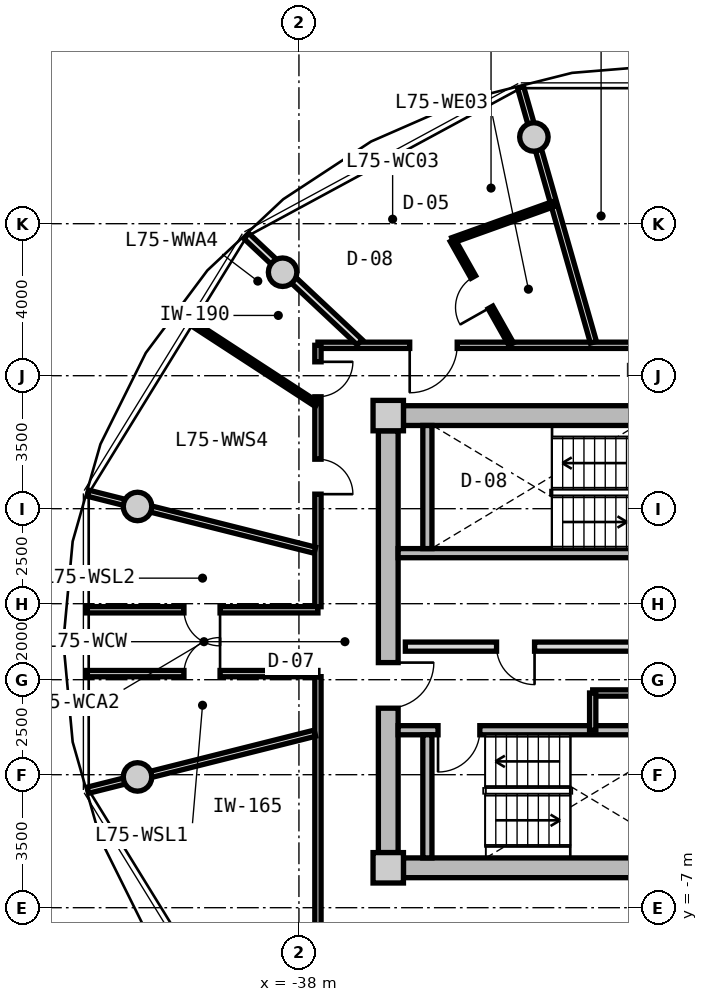
"""IFC4 building model, lengths in metres.
Left out: names, types, materials, properties, quantities, classifications, styles, units other than length and angle.
Written with IfcOpenShell. Run it as: python <this file> out.ifc"""

import sys

from ifc_helpers import new_model, si_unit, direction, frame, frame_2d, origin, origin_2d, place, context, subcontext, project, spatial, rectangle, circle, extrude, source, transform, mapped, element, fill, save


model = new_model("IFC4")
c1 = context("Model", 3, precision=1e-05, world=origin(), true_north=direction((0.0, 1.0)))
c2 = subcontext(c1, "Body", "Model", "MODEL_VIEW")
j1 = project(units=[si_unit("LENGTHUNIT", "METRE"), si_unit("PLANEANGLEUNIT", "RADIAN")], contexts=[c1])
p1 = place(None, origin())
s1 = spatial("IfcSite", under=j1, at=p1, CompositionType="ELEMENT")
p2 = place(p1, origin())
s2 = spatial("IfcBuilding", under=s1, at=p2, CompositionType="ELEMENT")
p3 = place(p2, frame((0.0, 0.0, 241.35)))
s3 = spatial("IfcBuildingStorey", under=s2, at=p3, CompositionType="ELEMENT", Elevation=241.35)
m1 = source(origin(), c2, "Body", "SweptSolid", [
    extrude(rectangle(XDim=0.8, YDim=0.8, at=origin_2d()), origin(), (0.0, 0.0, 1.0), 3.05),
])
for number, where, z_axis, x_axis in (
    (1, (-35.65, -5.95, 0.0), (0.0, 0.0, 1.0), (1.0, 0.0, 0.0)),
    (2, (-35.65, 5.95, 0.0), (0.0, 0.0, 1.0), (1.0, 0.0, 0.0)),
):
    element("IfcColumn", number, at=place(p3, frame(where, z_axis=z_axis, x_axis=x_axis)), inside=s3, PredefinedType="COLUMN", context=c2, shape_type="MappedRepresentation", body=[
        mapped(m1, transform((0.0, 0.0, 0.0), x_axis=(1.0, 0.0, 0.0), y_axis=(0.0, 1.0, 0.0), z_axis=(0.0, 0.0, 1.0), scale=1.0)),
    ])
m2 = source(origin(), c2, "Body", "SweptSolid", [
    extrude(rectangle(XDim=14.5, YDim=0.52, at=frame_2d((7.25, 0.0))), origin(), (0.0, 0.0, 1.0), 2.73),
])
for number, where, z_axis, x_axis in (
    (3, (-35.25, 5.95, 0.0), (0.0, 0.0, 1.0), (1.0, 0.0, 0.0)),
    (4, (-20.75, -5.95, 0.0), (0.0, 0.0, 1.0), (-1.0, 0.0, 0.0)),
):
    element("IfcWall", number, at=place(p3, frame(where, z_axis=z_axis, x_axis=x_axis)), inside=s3, PredefinedType="SHEAR", context=c2, shape_type="MappedRepresentation", body=[
        mapped(m2, transform((0.0, 0.0, 0.0), x_axis=(1.0, 0.0, 0.0), y_axis=(0.0, 1.0, 0.0), z_axis=(0.0, 0.0, 1.0), scale=1.0)),
    ])
m3 = source(origin(), c2, "Body", "SweptSolid", [
    extrude(rectangle(XDim=11.1, YDim=0.52, at=frame_2d((5.55, 0.0))), origin(), (0.0, 0.0, 1.0), 2.73),
])
p4 = place(p3, frame((-35.65, -5.55, 0.0), z_axis=(0.0, 0.0, 1.0), x_axis=(0.0, 1.0, 0.0)))
e5 = element("IfcWall", 5, at=p4, inside=s3, PredefinedType="SHEAR", context=c2, shape_type="MappedRepresentation", body=[
    mapped(m3, transform((0.0, 0.0, 0.0), x_axis=(1.0, 0.0, 0.0), y_axis=(0.0, 1.0, 0.0), z_axis=(0.0, 0.0, 1.0), scale=1.0)),
])
p5 = place(p4, frame((3.8, 0.0, 0.0)))
e6 = element("IfcOpeningElement", 6, at=p5, cuts=e5, PredefinedType="OPENING", context=c2, shape_type="SweptSolid", body=[
    extrude(rectangle(XDim=1.2, YDim=2.15, at=frame_2d((0.6, 1.075))), frame((0.0, 0.27, 0.0), z_axis=(0.0, -1.0, 0.0), x_axis=(1.0, 0.0, 0.0)), (0.0, 0.0, 1.0), 0.54),
])
m4 = source(origin(), c2, "Body", "SweptSolid", [
    extrude(circle(Radius=0.375, at=origin_2d()), origin(), (0.0, 0.0, 1.0), 3.05),
])
for number, where, z_axis, x_axis in (
    (7, (-31.818, 13.281, 0.0), (0.0, 0.0, 1.0), (1.0, 0.0, 0.0)),
    (8, (-38.43, 9.723, 0.0), (0.0, 0.0, 1.0), (1.0, 0.0, 0.0)),
    (9, (-42.247, 3.559, 0.0), (0.0, 0.0, 1.0), (1.0, 0.0, 0.0)),
    (10, (-42.247, -3.559, 0.0), (0.0, 0.0, 1.0), (1.0, 0.0, 0.0)),
):
    element("IfcColumn", number, at=place(p3, frame(where, z_axis=z_axis, x_axis=x_axis)), inside=s3, PredefinedType="COLUMN", context=c2, shape_type="MappedRepresentation", body=[
        mapped(m4, transform((0.0, 0.0, 0.0), x_axis=(1.0, 0.0, 0.0), y_axis=(0.0, 1.0, 0.0), z_axis=(0.0, 0.0, 1.0), scale=1.0)),
    ])
m5 = source(origin(), c2, "Body", "SweptSolid", [
    extrude(rectangle(XDim=7.93, YDim=0.24, at=frame_2d((3.965, 0.0))), origin(), (0.0, 0.0, 1.0), 2.73),
])
p6 = place(p3, frame((-35.39, 2.33, 0.0), z_axis=(0.0, 0.0, 1.0), x_axis=(1.0, 0.0, 0.0)))
e11 = element("IfcWall", 11, at=p6, inside=s3, PredefinedType="PARTITIONING", context=c2, shape_type="MappedRepresentation", body=[
    mapped(m5, transform((0.0, 0.0, 0.0), x_axis=(1.0, 0.0, 0.0), y_axis=(0.0, 1.0, 0.0), z_axis=(0.0, 0.0, 1.0), scale=1.0)),
])
m6 = source(origin(), c2, "Body", "SweptSolid", [
    extrude(rectangle(XDim=3.24, YDim=0.24, at=frame_2d((1.62, 0.0))), origin(), (0.0, 0.0, 1.0), 2.73),
])
p7 = place(p3, frame((-34.62, 2.45, 0.0), z_axis=(0.0, 0.0, 1.0), x_axis=(0.0, 1.0, 0.0)))
e12 = element("IfcWall", 12, at=p7, inside=s3, PredefinedType="PARTITIONING", context=c2, shape_type="MappedRepresentation", body=[
    mapped(m6, transform((0.0, 0.0, 0.0), x_axis=(1.0, 0.0, 0.0), y_axis=(0.0, 1.0, 0.0), z_axis=(0.0, 0.0, 1.0), scale=1.0)),
])
p8 = place(p3, frame((-35.39, -2.33, 0.0), z_axis=(0.0, 0.0, 1.0), x_axis=(1.0, 0.0, 0.0)))
e13 = element("IfcWall", 13, at=p8, inside=s3, PredefinedType="PARTITIONING", context=c2, shape_type="MappedRepresentation", body=[
    mapped(m5, transform((0.0, 0.0, 0.0), x_axis=(1.0, 0.0, 0.0), y_axis=(0.0, 1.0, 0.0), z_axis=(0.0, 0.0, 1.0), scale=1.0)),
])
p9 = place(p8, frame((1.05, 0.0, 0.0)))
e14 = element("IfcOpeningElement", 14, at=p9, cuts=e13, PredefinedType="OPENING", context=c2, shape_type="SweptSolid", body=[
    extrude(rectangle(XDim=1.1, YDim=2.15, at=frame_2d((0.55, 1.075))), frame((0.0, 0.13, 0.0), z_axis=(0.0, -1.0, 0.0), x_axis=(1.0, 0.0, 0.0)), (0.0, 0.0, 1.0), 0.26),
])
p10 = place(p3, frame((-34.62, -5.69, 0.0), z_axis=(0.0, 0.0, 1.0), x_axis=(0.0, 1.0, 0.0)))
e15 = element("IfcWall", 15, at=p10, inside=s3, PredefinedType="PARTITIONING", context=c2, shape_type="MappedRepresentation", body=[
    mapped(m6, transform((0.0, 0.0, 0.0), x_axis=(1.0, 0.0, 0.0), y_axis=(0.0, 1.0, 0.0), z_axis=(0.0, 0.0, 1.0), scale=1.0)),
])
m7 = source(origin(), c2, "Body", "SweptSolid", [
    extrude(rectangle(XDim=7.62, YDim=0.24, at=frame_2d((3.81, 0.0))), origin(), (0.0, 0.0, 1.0), 2.715),
])
p11 = place(p3, frame((-35.2, -0.13, 0.0), z_axis=(0.0, 0.0, 1.0), x_axis=(1.0, 0.0, 0.0)))
e16 = element("IfcWall", 16, at=p11, inside=s3, PredefinedType="PARTITIONING", context=c2, shape_type="MappedRepresentation", body=[
    mapped(m7, transform((0.0, 0.0, 0.0), x_axis=(1.0, 0.0, 0.0), y_axis=(0.0, 1.0, 0.0), z_axis=(0.0, 0.0, 1.0), scale=1.0)),
])
p12 = place(p11, frame((6.22, 0.0, 0.0)))
e17 = element("IfcOpeningElement", 17, at=p12, cuts=e16, PredefinedType="OPENING", context=c2, shape_type="SweptSolid", body=[
    extrude(rectangle(XDim=1.0, YDim=2.1, at=frame_2d((0.5, 1.05))), frame((0.0, 0.13, 0.0), z_axis=(0.0, -1.0, 0.0), x_axis=(1.0, 0.0, 0.0)), (0.0, 0.0, 1.0), 0.26),
])
p13 = place(p11, frame((2.4, 0.0, 0.0)))
e18 = element("IfcOpeningElement", 18, at=p13, cuts=e16, PredefinedType="OPENING", context=c2, shape_type="SweptSolid", body=[
    extrude(rectangle(XDim=1.0, YDim=2.1, at=frame_2d((0.5, 1.05))), frame((0.0, 0.13, 0.0), z_axis=(0.0, -1.0, 0.0), x_axis=(1.0, 0.0, 0.0)), (0.0, 0.0, 1.0), 0.26),
])
m8 = source(origin(), c2, "Body", "SweptSolid", [
    extrude(rectangle(XDim=4.77, YDim=0.165, at=frame_2d((2.385, 0.0))), origin(), (0.0, 0.0, 1.0), 2.715),
])
p14 = place(p3, frame((-30.27, -1.35, 0.0), z_axis=(0.0, 0.0, 1.0), x_axis=(1.0, 0.0, 0.0)))
e19 = element("IfcWall", 19, at=p14, inside=s3, PredefinedType="PARTITIONING", context=c2, shape_type="MappedRepresentation", body=[
    mapped(m8, transform((0.0, 0.0, 0.0), x_axis=(1.0, 0.0, 0.0), y_axis=(0.0, 1.0, 0.0), z_axis=(0.0, 0.0, 1.0), scale=1.0)),
])
p15 = place(p14, frame((1.85, 0.0, 0.0)))
e20 = element("IfcOpeningElement", 20, at=p15, cuts=e19, PredefinedType="OPENING", context=c2, shape_type="SweptSolid", body=[
    extrude(rectangle(XDim=1.0, YDim=2.1, at=frame_2d((0.5, 1.05))), frame((0.0, 0.093, 0.0), z_axis=(0.0, -1.0, 0.0), x_axis=(1.0, 0.0, 0.0)), (0.0, 0.0, 1.0), 0.185),
])
m9 = source(origin(), c2, "Body", "SweptSolid", [
    extrude(rectangle(XDim=0.98, YDim=0.165, at=frame_2d((0.49, 0.0))), origin(), (0.0, 0.0, 1.0), 2.715),
])
p16 = place(p3, frame((-30.27, -2.33, 0.0), z_axis=(0.0, 0.0, 1.0), x_axis=(0.0, 1.0, 0.0)))
e21 = element("IfcWall", 21, at=p16, inside=s3, PredefinedType="PARTITIONING", context=c2, shape_type="MappedRepresentation", body=[
    mapped(m9, transform((0.0, 0.0, 0.0), x_axis=(1.0, 0.0, 0.0), y_axis=(0.0, 1.0, 0.0), z_axis=(0.0, 0.0, 1.0), scale=1.0)),
])
m10 = source(origin(), c2, "Body", "SweptSolid", [
    extrude(rectangle(XDim=8.58, YDim=0.165, at=frame_2d((4.29, 0.0))), origin(), (0.0, 0.0, 1.0), 2.715),
])
p17 = place(p3, frame((-37.5, 7.8, 0.0), z_axis=(0.0, 0.0, 1.0), x_axis=(1.0, 0.0, 0.0)))
e22 = element("IfcWall", 22, at=p17, inside=s3, PredefinedType="PARTITIONING", context=c2, shape_type="MappedRepresentation", body=[
    mapped(m10, transform((0.0, 0.0, 0.0), x_axis=(1.0, 0.0, 0.0), y_axis=(0.0, 1.0, 0.0), z_axis=(0.0, 0.0, 1.0), scale=1.0)),
])
p18 = place(p17, frame((2.415, 0.0, 0.0)))
e23 = element("IfcOpeningElement", 23, at=p18, cuts=e22, PredefinedType="OPENING", context=c2, shape_type="SweptSolid", body=[
    extrude(rectangle(XDim=1.25, YDim=2.2, at=frame_2d((0.625, 1.1))), frame((0.0, 0.093, 0.0), z_axis=(0.0, -1.0, 0.0), x_axis=(1.0, 0.0, 0.0)), (0.0, 0.0, 1.0), 0.185),
])
m11 = source(origin(), c2, "Body", "SweptSolid", [
    extrude(rectangle(XDim=6.88, YDim=0.165, at=frame_2d((3.44, 0.0))), origin(), (0.0, 0.0, 1.0), 2.715),
])
p19 = place(p3, frame((-37.5, -7.8, 0.0), z_axis=(0.0, 0.0, 1.0), x_axis=(0.0, 1.0, 0.0)))
e24 = element("IfcWall", 24, at=p19, inside=s3, PredefinedType="PARTITIONING", context=c2, shape_type="MappedRepresentation", body=[
    mapped(m11, transform((0.0, 0.0, 0.0), x_axis=(1.0, 0.0, 0.0), y_axis=(0.0, 1.0, 0.0), z_axis=(0.0, 0.0, 1.0), scale=1.0)),
])
p20 = place(p3, frame((-37.5, 0.92, 0.0), z_axis=(0.0, 0.0, 1.0), x_axis=(0.0, 1.0, 0.0)))
e25 = element("IfcWall", 25, at=p20, inside=s3, PredefinedType="PARTITIONING", context=c2, shape_type="MappedRepresentation", body=[
    mapped(m11, transform((0.0, 0.0, 0.0), x_axis=(1.0, 0.0, 0.0), y_axis=(0.0, 1.0, 0.0), z_axis=(0.0, 0.0, 1.0), scale=1.0)),
])
p21 = place(p20, frame((5.525, 0.0, 0.0)))
e26 = element("IfcOpeningElement", 26, at=p21, cuts=e25, PredefinedType="OPENING", context=c2, shape_type="SweptSolid", body=[
    extrude(rectangle(XDim=0.92, YDim=2.1, at=frame_2d((0.46, 1.05))), frame((0.0, 0.093, 0.0), z_axis=(0.0, -1.0, 0.0), x_axis=(1.0, 0.0, 0.0)), (0.0, 0.0, 1.0), 0.185),
])
p22 = place(p20, frame((2.962, 0.0, 0.0)))
e27 = element("IfcOpeningElement", 27, at=p22, cuts=e25, PredefinedType="OPENING", context=c2, shape_type="SweptSolid", body=[
    extrude(rectangle(XDim=0.92, YDim=2.1, at=frame_2d((0.46, 1.05))), frame((0.0, 0.093, 0.0), z_axis=(0.0, -1.0, 0.0), x_axis=(1.0, 0.0, 0.0)), (0.0, 0.0, 1.0), 0.185),
])
m12 = source(origin(), c2, "Body", "SweptSolid", [
    extrude(rectangle(XDim=6.974, YDim=0.165, at=frame_2d((3.487, 0.0))), origin(), (0.0, 0.0, 1.0), 2.315),
])
p23 = place(p3, frame((-30.251, 7.88, 0.0), z_axis=(0.0, 0.0, 1.0), x_axis=(-0.274707256801, 0.961527910703, 0.0)))
e28 = element("IfcWall", 28, at=p23, inside=s3, PredefinedType="PARTITIONING", context=c2, shape_type="MappedRepresentation", body=[
    mapped(m12, transform((0.0, 0.0, 0.0), x_axis=(1.0, 0.0, 0.0), y_axis=(0.0, 1.0, 0.0), z_axis=(0.0, 0.0, 1.0), scale=1.0)),
])
m13 = source(origin(), c2, "Body", "SweptSolid", [
    extrude(rectangle(XDim=6.157, YDim=0.165, at=frame_2d((3.079, 0.0))), origin(), (0.0, 0.0, 1.0), 2.315),
])
for number, where, z_axis, x_axis in (
    (29, (-37.58, 2.407, 0.0), (0.0, 0.0, 1.0), (-0.97, 0.244, 0.0)),
    (30, (-37.58, -2.407, 0.0), (0.0, 0.0, 1.0), (-0.97, -0.244, 0.0)),
):
    element("IfcWall", number, at=place(p3, frame(where, z_axis=z_axis, x_axis=x_axis)), inside=s3, PredefinedType="PARTITIONING", context=c2, shape_type="MappedRepresentation", body=[
        mapped(m13, transform((0.0, 0.0, 0.0), x_axis=(1.0, 0.0, 0.0), y_axis=(0.0, 1.0, 0.0), z_axis=(0.0, 0.0, 1.0), scale=1.0)),
    ])
m14 = source(origin(), c2, "Body", "SweptSolid", [
    extrude(rectangle(XDim=6.101, YDim=0.165, at=frame_2d((3.051, 0.0))), origin(), (0.0, 0.0, 1.0), 2.715),
])
p24 = place(p3, frame((-43.601, 0.84, 0.0), z_axis=(0.0, 0.0, 1.0), x_axis=(1.0, 0.0, 0.0)))
e31 = element("IfcWall", 31, at=p24, inside=s3, PredefinedType="PARTITIONING", context=c2, shape_type="MappedRepresentation", body=[
    mapped(m14, transform((0.0, 0.0, 0.0), x_axis=(1.0, 0.0, 0.0), y_axis=(0.0, 1.0, 0.0), z_axis=(0.0, 0.0, 1.0), scale=1.0)),
])
p25 = place(p24, frame((2.576, 0.0, 0.0)))
e32 = element("IfcOpeningElement", 32, at=p25, cuts=e31, PredefinedType="OPENING", context=c2, shape_type="SweptSolid", body=[
    extrude(rectangle(XDim=0.95, YDim=2.1, at=frame_2d((0.475, 1.05))), frame((0.0, 0.093, 0.0), z_axis=(0.0, -1.0, 0.0), x_axis=(1.0, 0.0, 0.0)), (0.0, 0.0, 1.0), 0.185),
])
p26 = place(p3, frame((-37.5, -0.84, 0.0), z_axis=(0.0, 0.0, 1.0), x_axis=(-1.0, 0.0, 0.0)))
e33 = element("IfcWall", 33, at=p26, inside=s3, PredefinedType="PARTITIONING", context=c2, shape_type="MappedRepresentation", body=[
    mapped(m14, transform((0.0, 0.0, 0.0), x_axis=(1.0, 0.0, 0.0), y_axis=(0.0, 1.0, 0.0), z_axis=(0.0, 0.0, 1.0), scale=1.0)),
])
p27 = place(p26, frame((2.576, 0.0, 0.0)))
e34 = element("IfcOpeningElement", 34, at=p27, cuts=e33, PredefinedType="OPENING", context=c2, shape_type="SweptSolid", body=[
    extrude(rectangle(XDim=0.95, YDim=2.1, at=frame_2d((0.475, 1.05))), frame((0.0, 0.093, 0.0), z_axis=(0.0, -1.0, 0.0), x_axis=(1.0, 0.0, 0.0)), (0.0, 0.0, 1.0), 0.185),
])
m15 = source(origin(), c2, "Body", "SweptSolid", [
    extrude(rectangle(XDim=4.089, YDim=0.19, at=frame_2d((2.044, 0.0))), origin(), (0.0, 0.0, 1.0), 2.315),
])
p28 = place(p3, frame((-36.402, 7.88, 0.0), z_axis=(0.0, 0.0, 1.0), x_axis=(-0.729401273609, 0.684086092577, 0.0)))
e35 = element("IfcWall", 35, at=p28, inside=s3, PredefinedType="PARTITIONING", context=c2, shape_type="MappedRepresentation", body=[
    mapped(m15, transform((0.0, 0.0, 0.0), x_axis=(1.0, 0.0, 0.0), y_axis=(0.0, 1.0, 0.0), z_axis=(0.0, 0.0, 1.0), scale=1.0)),
])
m16 = source(origin(), c2, "Body", "SweptSolid", [
    extrude(rectangle(XDim=3.14, YDim=0.14, at=frame_2d((1.57, 0.0))), origin(), (0.0, 0.0, 1.0), 2.715),
])
p29 = place(p3, frame((-32.415, 7.83, 0.0), z_axis=(0.0, 0.0, 1.0), x_axis=(-0.491132137966, 0.871085083707, 0.0)))
e36 = element("IfcWall", 36, at=p29, inside=s3, PredefinedType="PARTITIONING", context=c2, shape_type="MappedRepresentation", body=[
    mapped(m16, transform((0.0, 0.0, 0.0), x_axis=(1.0, 0.0, 0.0), y_axis=(0.0, 1.0, 0.0), z_axis=(0.0, 0.0, 1.0), scale=1.0)),
])
p30 = place(p29, frame((1.11, 0.0, 0.0)))
e37 = element("IfcOpeningElement", 37, at=p30, cuts=e36, PredefinedType="OPENING", context=c2, shape_type="SweptSolid", body=[
    extrude(rectangle(XDim=0.92, YDim=2.1, at=frame_2d((0.46, 1.05))), frame((0.0, 0.08, 0.0), z_axis=(0.0, -1.0, 0.0), x_axis=(1.0, 0.0, 0.0)), (0.0, 0.0, 1.0), 0.16),
])
m17 = source(origin(), c2, "Body", "SweptSolid", [
    extrude(rectangle(XDim=2.831, YDim=0.14, at=frame_2d((1.416, 0.0))), origin(), (0.0, 0.0, 1.0), 2.715),
])
p31 = place(p3, frame((-33.957, 10.565, 0.0), z_axis=(0.0, 0.0, 1.0), x_axis=(0.941411742535, 0.337259441701, 0.0)))
e38 = element("IfcWall", 38, at=p31, inside=s3, PredefinedType="PARTITIONING", context=c2, shape_type="MappedRepresentation", body=[
    mapped(m17, transform((0.0, 0.0, 0.0), x_axis=(1.0, 0.0, 0.0), y_axis=(0.0, 1.0, 0.0), z_axis=(0.0, 0.0, 1.0), scale=1.0)),
])
m18 = source(origin(), c2, "Body", "SweptSolid", [
    extrude(rectangle(XDim=3.904, YDim=0.14, at=frame_2d((1.952, 0.0))), origin(), (0.0, 0.0, 1.0), 2.715),
])
p32 = place(p3, frame((-37.53, 6.246, 0.0), z_axis=(0.0, 0.0, 1.0), x_axis=(-0.838024687996, 0.545632314209, 0.0)))
e39 = element("IfcWall", 39, at=p32, inside=s3, PredefinedType="PARTITIONING", context=c2, shape_type="MappedRepresentation", body=[
    mapped(m18, transform((0.0, 0.0, 0.0), x_axis=(1.0, 0.0, 0.0), y_axis=(0.0, 1.0, 0.0), z_axis=(0.0, 0.0, 1.0), scale=1.0)),
])
m19 = source(origin(), c2, "Body", "SweptSolid", [
    extrude(rectangle(XDim=1.1, YDim=2.15, at=frame_2d((0.55, 1.075))), frame((0.0, 0.025, 0.0), z_axis=(0.0, -1.0, 0.0), x_axis=(1.0, 0.0, 0.0)), (0.0, 0.0, 1.0), 0.05),
])
p33 = place(p9, frame((1.1, 0.0, 0.0), z_axis=(0.0, 0.0, 1.0), x_axis=(-1.0, 0.0, 0.0)))
e40 = element("IfcDoor", 40, at=p33, inside=s3, OperationType="SINGLE_SWING_RIGHT", PredefinedType="DOOR", context=c2, shape_type="MappedRepresentation", body=[
    mapped(m19, transform((0.0, 0.0, 0.0), x_axis=(1.0, 0.0, 0.0), y_axis=(0.0, 1.0, 0.0), z_axis=(0.0, 0.0, 1.0), scale=1.0)),
])
fill(e14, e40)
m20 = source(origin(), c2, "Body", "SweptSolid", [
    extrude(rectangle(XDim=1.2, YDim=2.15, at=frame_2d((0.6, 1.075))), frame((0.0, 0.025, 0.0), z_axis=(0.0, -1.0, 0.0), x_axis=(1.0, 0.0, 0.0)), (0.0, 0.0, 1.0), 0.05),
])
p34 = place(p5, frame((1.2, 0.0, 0.0), z_axis=(0.0, 0.0, 1.0), x_axis=(-1.0, 0.0, 0.0)))
e41 = element("IfcDoor", 41, at=p34, inside=s3, OperationType="SINGLE_SWING_LEFT", PredefinedType="DOOR", context=c2, shape_type="MappedRepresentation", body=[
    mapped(m20, transform((0.0, 0.0, 0.0), x_axis=(1.0, 0.0, 0.0), y_axis=(0.0, 1.0, 0.0), z_axis=(0.0, 0.0, 1.0), scale=1.0)),
])
fill(e6, e41)
m21 = source(origin(), c2, "Body", "SweptSolid", [
    extrude(rectangle(XDim=1.0, YDim=2.1, at=frame_2d((0.5, 1.05))), frame((0.0, 0.025, 0.0), z_axis=(0.0, -1.0, 0.0), x_axis=(1.0, 0.0, 0.0)), (0.0, 0.0, 1.0), 0.05),
])
p35 = place(p13, frame((1.0, 0.0, 0.0), z_axis=(0.0, 0.0, 1.0), x_axis=(-1.0, 0.0, 0.0)))
e42 = element("IfcDoor", 42, at=p35, inside=s3, OperationType="SINGLE_SWING_LEFT", PredefinedType="DOOR", context=c2, shape_type="MappedRepresentation", body=[
    mapped(m21, transform((0.0, 0.0, 0.0), x_axis=(1.0, 0.0, 0.0), y_axis=(0.0, 1.0, 0.0), z_axis=(0.0, 0.0, 1.0), scale=1.0)),
])
fill(e18, e42)
m22 = source(origin(), c2, "Body", "SweptSolid", [
    extrude(rectangle(XDim=0.95, YDim=2.1, at=frame_2d((0.475, 1.05))), frame((0.0, 0.025, 0.0), z_axis=(0.0, -1.0, 0.0), x_axis=(1.0, 0.0, 0.0)), (0.0, 0.0, 1.0), 0.05),
])
p36 = place(p27, frame((0.95, 0.0, 0.0), z_axis=(0.0, 0.0, 1.0), x_axis=(-1.0, 0.0, 0.0)))
e43 = element("IfcDoor", 43, at=p36, inside=s3, OperationType="SINGLE_SWING_RIGHT", PredefinedType="DOOR", context=c2, shape_type="MappedRepresentation", body=[
    mapped(m22, transform((0.0, 0.0, 0.0), x_axis=(1.0, 0.0, 0.0), y_axis=(0.0, 1.0, 0.0), z_axis=(0.0, 0.0, 1.0), scale=1.0)),
])
fill(e34, e43)
p37 = place(p25, frame((0.95, 0.0, 0.0), z_axis=(0.0, 0.0, 1.0), x_axis=(-1.0, 0.0, 0.0)))
e44 = element("IfcDoor", 44, at=p37, inside=s3, OperationType="SINGLE_SWING_LEFT", PredefinedType="DOOR", context=c2, shape_type="MappedRepresentation", body=[
    mapped(m22, transform((0.0, 0.0, 0.0), x_axis=(1.0, 0.0, 0.0), y_axis=(0.0, 1.0, 0.0), z_axis=(0.0, 0.0, 1.0), scale=1.0)),
])
fill(e32, e44)
m23 = source(origin(), c2, "Body", "SweptSolid", [
    extrude(rectangle(XDim=1.25, YDim=2.2, at=frame_2d((0.625, 1.1))), frame((0.0, 0.025, 0.0), z_axis=(0.0, -1.0, 0.0), x_axis=(1.0, 0.0, 0.0)), (0.0, 0.0, 1.0), 0.05),
])
p38 = place(p18, frame((1.25, 0.0, 0.0), z_axis=(0.0, 0.0, 1.0), x_axis=(-1.0, 0.0, 0.0)))
e45 = element("IfcDoor", 45, at=p38, inside=s3, OperationType="SINGLE_SWING_RIGHT", PredefinedType="DOOR", context=c2, shape_type="MappedRepresentation", body=[
    mapped(m23, transform((0.0, 0.0, 0.0), x_axis=(1.0, 0.0, 0.0), y_axis=(0.0, 1.0, 0.0), z_axis=(0.0, 0.0, 1.0), scale=1.0)),
])
fill(e23, e45)
m24 = source(origin(), c2, "Body", "SweptSolid", [
    extrude(rectangle(XDim=0.92, YDim=2.1, at=frame_2d((0.46, 1.05))), frame((0.0, 0.025, 0.0), z_axis=(0.0, -1.0, 0.0), x_axis=(1.0, 0.0, 0.0)), (0.0, 0.0, 1.0), 0.05),
])
p39 = place(p30, origin())
e46 = element("IfcDoor", 46, at=p39, inside=s3, OperationType="SINGLE_SWING_LEFT", PredefinedType="DOOR", context=c2, shape_type="MappedRepresentation", body=[
    mapped(m24, transform((0.0, 0.0, 0.0), x_axis=(1.0, 0.0, 0.0), y_axis=(0.0, 1.0, 0.0), z_axis=(0.0, 0.0, 1.0), scale=1.0)),
])
fill(e37, e46)
p40 = place(p21, frame((0.92, 0.0, 0.0), z_axis=(0.0, 0.0, 1.0), x_axis=(-1.0, 0.0, 0.0)))
e47 = element("IfcDoor", 47, at=p40, inside=s3, OperationType="SINGLE_SWING_LEFT", PredefinedType="DOOR", context=c2, shape_type="MappedRepresentation", body=[
    mapped(m24, transform((0.0, 0.0, 0.0), x_axis=(1.0, 0.0, 0.0), y_axis=(0.0, 1.0, 0.0), z_axis=(0.0, 0.0, 1.0), scale=1.0)),
])
fill(e26, e47)
p41 = place(p22, frame((0.92, 0.0, 0.0), z_axis=(0.0, 0.0, 1.0), x_axis=(-1.0, 0.0, 0.0)))
e48 = element("IfcDoor", 48, at=p41, inside=s3, OperationType="SINGLE_SWING_RIGHT", PredefinedType="DOOR", context=c2, shape_type="MappedRepresentation", body=[
    mapped(m24, transform((0.0, 0.0, 0.0), x_axis=(1.0, 0.0, 0.0), y_axis=(0.0, 1.0, 0.0), z_axis=(0.0, 0.0, 1.0), scale=1.0)),
])
fill(e27, e48)
save(model, sys.argv[1])
